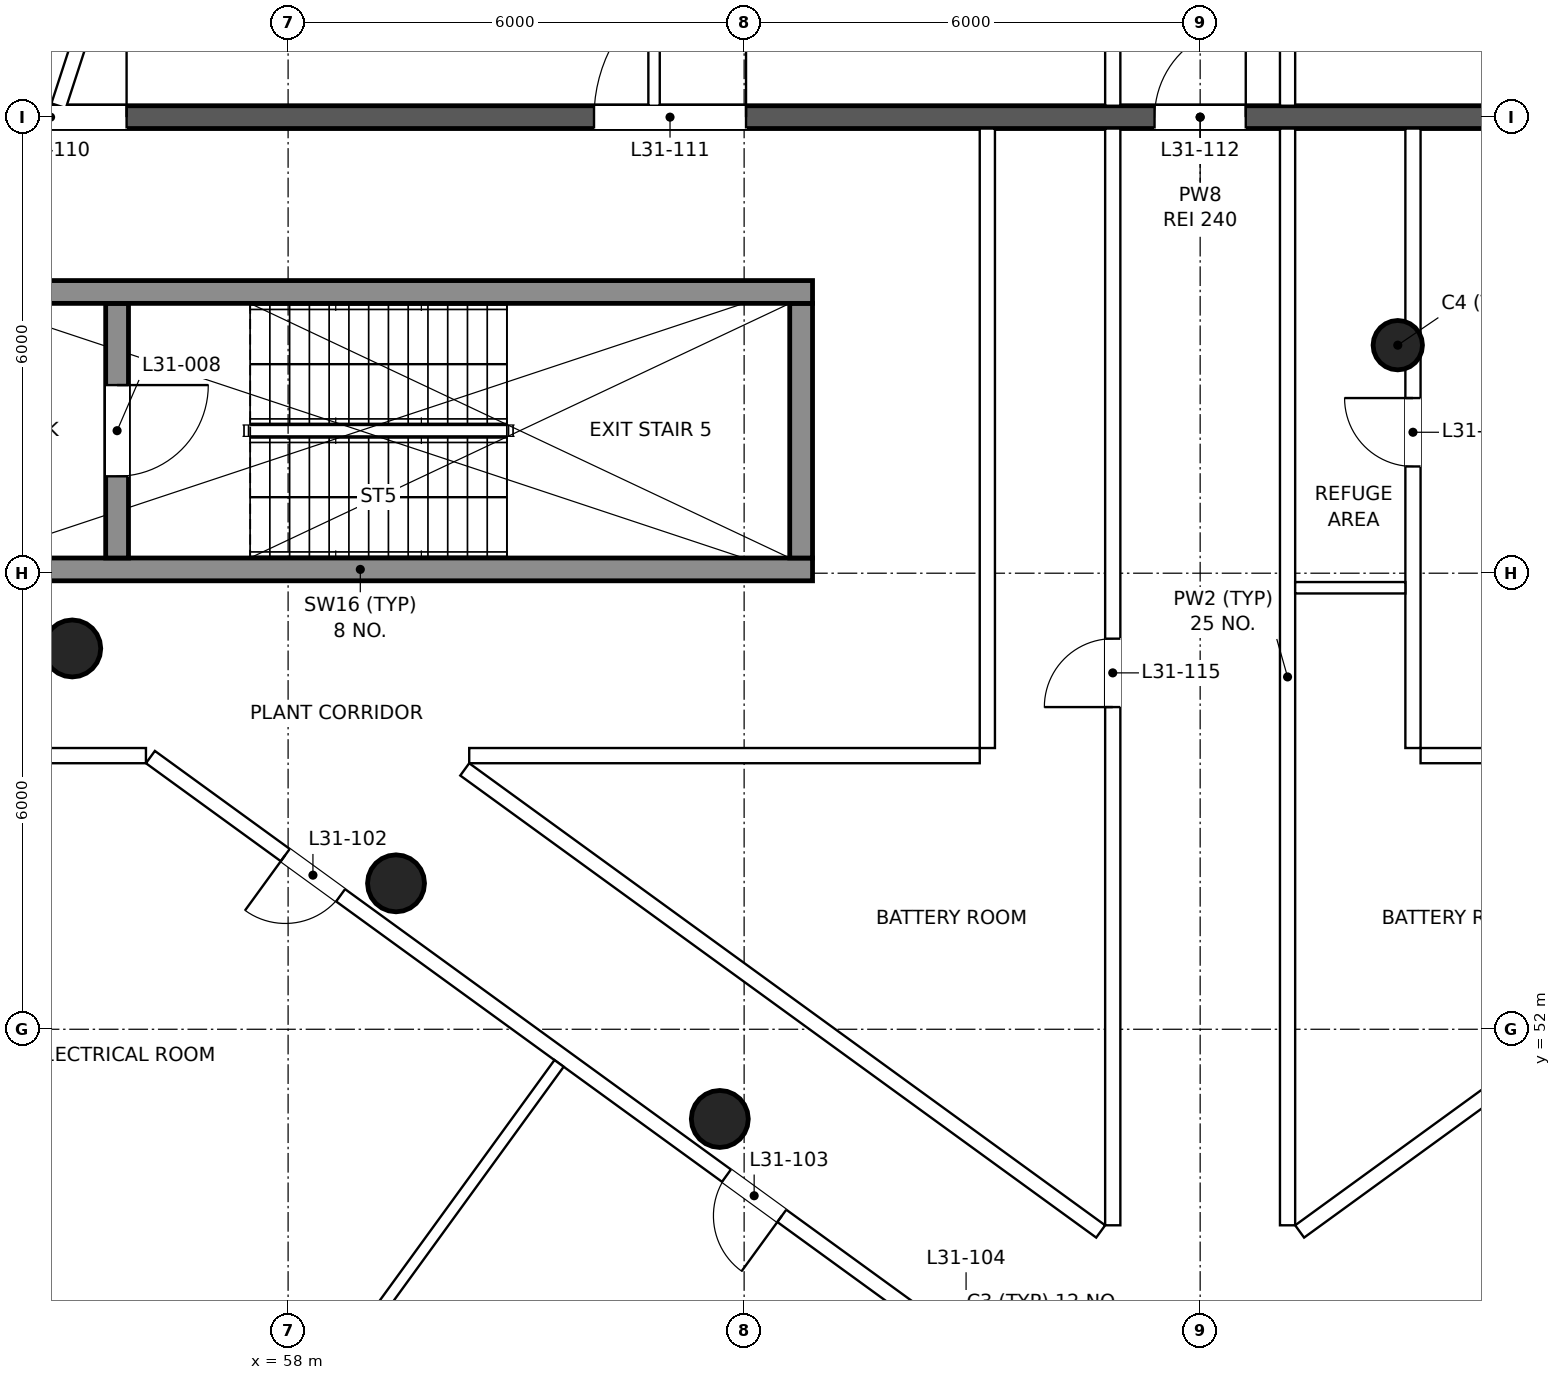
"""IFC4 building model, lengths in metres.
Left out: names, types, materials, properties, quantities, classifications, styles, units other than length and angle.
Written with IfcOpenShell. Run it as: python <this file> out.ifc"""

import sys

from ifc_helpers import new_model, si_unit, direction, frame, frame_2d, origin, origin_2d, place, context, subcontext, project, spatial, rectangle, circle, extrude, element, fill, save


model = new_model("IFC4")
c1 = context("Model", 3, precision=1e-05, world=origin(), true_north=direction((0.0, 1.0)))
c2 = subcontext(c1, "Body", "Model", "MODEL_VIEW")
j1 = project(units=[si_unit("LENGTHUNIT", "METRE"), si_unit("PLANEANGLEUNIT", "RADIAN")], contexts=[c1])
p1 = place(None, origin())
s1 = spatial("IfcSite", under=j1, at=p1, CompositionType="ELEMENT")
p2 = place(p1, origin())
s2 = spatial("IfcBuilding", under=s1, at=p2, CompositionType="ELEMENT")
p3 = place(p2, frame((0.0, 0.0, 137.6)))
s3 = spatial("IfcBuildingStorey", under=s2, at=p3, CompositionType="ELEMENT", Elevation=137.6)
for number, where, z_axis, x_axis in (
    (1, (55.16, 57.01, 0.0), (0.0, 0.0, 1.0), (1.0, 0.0, 0.0)),
    (2, (59.42, 53.92, 0.0), (0.0, 0.0, 1.0), (1.0, 0.0, 0.0)),
    (3, (63.68, 50.82, 0.0), (0.0, 0.0, 1.0), (1.0, 0.0, 0.0)),
):
    element("IfcColumn", number, at=place(p3, frame(where, z_axis=z_axis, x_axis=x_axis)), inside=s3, PredefinedType="COLUMN", context=c2, shape_type="SweptSolid", body=[
        extrude(circle(Radius=0.375, at=origin_2d()), origin(), (0.0, 0.0, 1.0), 5.0),
    ])
p4 = place(p3, frame((72.6, 61.0, 0.0), z_axis=(0.0, 0.0, 1.0), x_axis=(1.0, 0.0, 0.0)))
e4 = element("IfcColumn", 4, at=p4, inside=s3, PredefinedType="COLUMN", context=c2, shape_type="SweptSolid", body=[
    extrude(circle(Radius=0.325, at=origin_2d()), origin(), (0.0, 0.0, 1.0), 5.0),
])
p5 = place(p3, frame((52.273, 49.971, 0.0), z_axis=(0.0, 0.0, 1.0), x_axis=(0.809014428854, -0.587788783413, 0.0)))
e5 = element("IfcWall", 5, at=p5, inside=s3, PredefinedType="SOLIDWALL", context=c2, shape_type="SweptSolid", body=[
    extrude(rectangle(XDim=16.304, YDim=0.32, at=frame_2d((8.152, 0.0))), origin(), (0.0, 0.0, 1.0), 4.6),
])
p6 = place(p3, frame((53.0, 58.05, 0.0), z_axis=(0.0, 0.0, 1.0), x_axis=(1.0, 0.0, 0.0)))
e6 = element("IfcWall", 6, at=p6, inside=s3, PredefinedType="SHEAR", context=c2, shape_type="SweptSolid", body=[
    extrude(rectangle(XDim=11.9, YDim=0.3, at=frame_2d((5.95, 0.0))), origin(), (0.0, 0.0, 1.0), 5.0),
])
p7 = place(p6, frame((0.65, 0.0, 0.0)))
e7 = element("IfcOpeningElement", 7, at=p7, cuts=e6, PredefinedType="OPENING", context=c2, shape_type="SweptSolid", body=[
    extrude(rectangle(XDim=1.1, YDim=2.1, at=frame_2d((0.55, 1.05))), frame((0.0, 0.16, 0.0), z_axis=(0.0, -1.0, 0.0), x_axis=(1.0, 0.0, 0.0)), (0.0, 0.0, 1.0), 0.32),
])
p8 = place(p3, frame((55.75, 58.2, 0.0), z_axis=(0.0, 0.0, 1.0), x_axis=(0.0, 1.0, 0.0)))
e8 = element("IfcWall", 8, at=p8, inside=s3, PredefinedType="SHEAR", context=c2, shape_type="SweptSolid", body=[
    extrude(rectangle(XDim=3.35, YDim=0.3, at=frame_2d((1.675, 0.0))), origin(), (0.0, 0.0, 1.0), 5.0),
])
p9 = place(p8, frame((1.075, 0.0, 0.0)))
e9 = element("IfcOpeningElement", 9, at=p9, cuts=e8, PredefinedType="OPENING", context=c2, shape_type="SweptSolid", body=[
    extrude(rectangle(XDim=1.2, YDim=2.1, at=frame_2d((0.6, 1.05))), frame((0.0, 0.16, 0.0), z_axis=(0.0, -1.0, 0.0), x_axis=(1.0, 0.0, 0.0)), (0.0, 0.0, 1.0), 0.32),
])
p10 = place(p3, frame((64.75, 58.2, 0.0), z_axis=(0.0, 0.0, 1.0), x_axis=(0.0, 1.0, 0.0)))
e10 = element("IfcWall", 10, at=p10, inside=s3, PredefinedType="SHEAR", context=c2, shape_type="SweptSolid", body=[
    extrude(rectangle(XDim=3.35, YDim=0.3, at=frame_2d((1.675, 0.0))), origin(), (0.0, 0.0, 1.0), 5.0),
])
p11 = place(p3, frame((53.0, 61.7, 0.0), z_axis=(0.0, 0.0, 1.0), x_axis=(1.0, 0.0, 0.0)))
e11 = element("IfcWall", 11, at=p11, inside=s3, PredefinedType="SHEAR", context=c2, shape_type="SweptSolid", body=[
    extrude(rectangle(XDim=11.9, YDim=0.3, at=frame_2d((5.95, 0.0))), origin(), (0.0, 0.0, 1.0), 5.0),
])
p12 = place(p3, frame((45.49, 64.0, 0.0), z_axis=(0.0, 0.0, 1.0), x_axis=(1.0, 0.0, 0.0)))
e12 = element("IfcWall", 12, at=p12, inside=s3, PredefinedType="PARTITIONING", context=c2, shape_type="SweptSolid", body=[
    extrude(rectangle(XDim=49.02, YDim=0.3, at=frame_2d((24.51, 0.0))), origin(), (0.0, 0.0, 1.0), 3.9),
])
p13 = place(p12, frame((8.385, 0.0, 0.0)))
e13 = element("IfcOpeningElement", 13, at=p13, cuts=e12, PredefinedType="OPENING", context=c2, shape_type="SweptSolid", body=[
    extrude(rectangle(XDim=2.0, YDim=2.1, at=frame_2d((1.0, 1.05))), frame((0.0, 0.16, 0.0), z_axis=(0.0, -1.0, 0.0), x_axis=(1.0, 0.0, 0.0)), (0.0, 0.0, 1.0), 0.32),
])
p14 = place(p12, frame((16.535, 0.0, 0.0)))
e14 = element("IfcOpeningElement", 14, at=p14, cuts=e12, PredefinedType="OPENING", context=c2, shape_type="SweptSolid", body=[
    extrude(rectangle(XDim=2.0, YDim=2.1, at=frame_2d((1.0, 1.05))), frame((0.0, 0.16, 0.0), z_axis=(0.0, -1.0, 0.0), x_axis=(1.0, 0.0, 0.0)), (0.0, 0.0, 1.0), 0.32),
])
p15 = place(p12, frame((23.91, 0.0, 0.0)))
e15 = element("IfcOpeningElement", 15, at=p15, cuts=e12, PredefinedType="OPENING", context=c2, shape_type="SweptSolid", body=[
    extrude(rectangle(XDim=1.2, YDim=2.1, at=frame_2d((0.6, 1.05))), frame((0.0, 0.16, 0.0), z_axis=(0.0, -1.0, 0.0), x_axis=(1.0, 0.0, 0.0)), (0.0, 0.0, 1.0), 0.32),
])
p16 = place(p12, frame((30.435, 0.0, 0.0)))
e16 = element("IfcOpeningElement", 16, at=p16, cuts=e12, PredefinedType="OPENING", context=c2, shape_type="SweptSolid", body=[
    extrude(rectangle(XDim=2.0, YDim=2.1, at=frame_2d((1.0, 1.05))), frame((0.0, 0.16, 0.0), z_axis=(0.0, -1.0, 0.0), x_axis=(1.0, 0.0, 0.0)), (0.0, 0.0, 1.0), 0.32),
])
p17 = place(p12, frame((38.635, 0.0, 0.0)))
e17 = element("IfcOpeningElement", 17, at=p17, cuts=e12, PredefinedType="OPENING", context=c2, shape_type="SweptSolid", body=[
    extrude(rectangle(XDim=2.0, YDim=2.1, at=frame_2d((1.0, 1.05))), frame((0.0, 0.16, 0.0), z_axis=(0.0, -1.0, 0.0), x_axis=(1.0, 0.0, 0.0)), (0.0, 0.0, 1.0), 0.32),
])
p18 = place(p3, frame((52.563, 64.15, 0.0), z_axis=(0.0, 0.0, 1.0), x_axis=(0.309005574406, 0.951060226792, 0.0)))
e18 = element("IfcWall", 18, at=p18, inside=s3, PredefinedType="PARTITIONING", context=c2, shape_type="SweptSolid", body=[
    extrude(rectangle(XDim=13.373, YDim=0.2, at=frame_2d((6.687, 0.0))), origin(), (0.0, 0.0, 1.0), 4.6),
])
p19 = place(p18, frame((4.302, 0.0, 0.0)))
e19 = element("IfcOpeningElement", 19, at=p19, cuts=e18, PredefinedType="OPENING", context=c2, shape_type="SweptSolid", body=[
    extrude(rectangle(XDim=0.9, YDim=2.1, at=frame_2d((0.45, 1.05))), frame((0.0, 0.11, 0.0), z_axis=(0.0, -1.0, 0.0), x_axis=(1.0, 0.0, 0.0)), (0.0, 0.0, 1.0), 0.22),
])
p20 = place(p18, frame((10.632, 0.0, 0.0)))
e20 = element("IfcOpeningElement", 20, at=p20, cuts=e18, PredefinedType="OPENING", context=c2, shape_type="SweptSolid", body=[
    extrude(rectangle(XDim=0.9, YDim=2.1, at=frame_2d((0.45, 1.05))), frame((0.0, 0.11, 0.0), z_axis=(0.0, -1.0, 0.0), x_axis=(1.0, 0.0, 0.0)), (0.0, 0.0, 1.0), 0.22),
])
p21 = place(p3, frame((83.812, 55.581, 0.0), z_axis=(0.0, 0.0, 1.0), x_axis=(-0.809019673584, -0.58778156466, 0.0)))
e21 = element("IfcWall", 21, at=p21, inside=s3, PredefinedType="PARTITIONING", context=c2, shape_type="SweptSolid", body=[
    extrude(rectangle(XDim=14.179, YDim=0.2, at=frame_2d((7.09, 0.0))), origin(), (0.0, 0.0, 1.0), 3.6),
])
p22 = place(p21, frame((10.015, 0.0, 0.0)))
e22 = element("IfcOpeningElement", 22, at=p22, cuts=e21, PredefinedType="OPENING", context=c2, shape_type="SweptSolid", body=[
    extrude(rectangle(XDim=0.9, YDim=2.1, at=frame_2d((0.45, 1.05))), frame((0.0, 0.11, 0.0), z_axis=(0.0, -1.0, 0.0), x_axis=(1.0, 0.0, 0.0)), (0.0, 0.0, 1.0), 0.22),
])
p23 = place(p21, frame((4.094, 0.0, 0.0)))
e23 = element("IfcOpeningElement", 23, at=p23, cuts=e21, PredefinedType="OPENING", context=c2, shape_type="SweptSolid", body=[
    extrude(rectangle(XDim=0.9, YDim=2.1, at=frame_2d((0.45, 1.05))), frame((0.0, 0.11, 0.0), z_axis=(0.0, -1.0, 0.0), x_axis=(1.0, 0.0, 0.0)), (0.0, 0.0, 1.0), 0.22),
])
p24 = place(p3, frame((67.66, 47.247, 0.0), z_axis=(0.0, 0.0, 1.0), x_axis=(-0.809019673584, 0.58778156466, 0.0)))
e24 = element("IfcWall", 24, at=p24, inside=s3, PredefinedType="PARTITIONING", context=c2, shape_type="SweptSolid", body=[
    extrude(rectangle(XDim=14.179, YDim=0.2, at=frame_2d((7.09, 0.0))), origin(), (0.0, 0.0, 1.0), 3.9),
])
p25 = place(p24, frame((11.086, 0.0, 0.0)))
e25 = element("IfcOpeningElement", 25, at=p25, cuts=e24, PredefinedType="OPENING", context=c2, shape_type="SweptSolid", body=[
    extrude(rectangle(XDim=0.9, YDim=2.1, at=frame_2d((0.45, 1.05))), frame((0.0, 0.11, 0.0), z_axis=(0.0, -1.0, 0.0), x_axis=(1.0, 0.0, 0.0)), (0.0, 0.0, 1.0), 0.22),
])
p26 = place(p24, frame((3.911, 0.0, 0.0)))
e26 = element("IfcOpeningElement", 26, at=p26, cuts=e24, PredefinedType="OPENING", context=c2, shape_type="SweptSolid", body=[
    extrude(rectangle(XDim=0.9, YDim=2.1, at=frame_2d((0.45, 1.05))), frame((0.0, 0.11, 0.0), z_axis=(0.0, -1.0, 0.0), x_axis=(1.0, 0.0, 0.0)), (0.0, 0.0, 1.0), 0.22),
])
p27 = place(p24, frame((0.514, 0.0, 0.0)))
e27 = element("IfcOpeningElement", 27, at=p27, cuts=e24, PredefinedType="OPENING", context=c2, shape_type="SweptSolid", body=[
    extrude(rectangle(XDim=0.8, YDim=2.1, at=frame_2d((0.4, 1.05))), frame((0.0, 0.11, 0.0), z_axis=(0.0, -1.0, 0.0), x_axis=(1.0, 0.0, 0.0)), (0.0, 0.0, 1.0), 0.22),
])
p28 = place(p3, frame((56.13, 55.6, 0.0), z_axis=(0.0, 0.0, 1.0), x_axis=(-1.0, 0.0, 0.0)))
e28 = element("IfcWall", 28, at=p28, inside=s3, PredefinedType="PARTITIONING", context=c2, shape_type="SweptSolid", body=[
    extrude(rectangle(XDim=5.33, YDim=0.2, at=frame_2d((2.665, 0.0))), origin(), (0.0, 0.0, 1.0), 4.6),
])
p29 = place(p3, frame((71.15, 68.6, 0.0), z_axis=(0.0, 0.0, 1.0), x_axis=(0.0, -1.0, 0.0)))
e29 = element("IfcWall", 29, at=p29, inside=s3, PredefinedType="PARTITIONING", context=c2, shape_type="SweptSolid", body=[
    extrude(rectangle(XDim=4.45, YDim=0.2, at=frame_2d((2.225, 0.0))), origin(), (0.0, 0.0, 1.0), 4.6),
])
p30 = place(p3, frame((71.15, 63.85, 0.0), z_axis=(0.0, 0.0, 1.0), x_axis=(0.0, -1.0, 0.0)))
e30 = element("IfcWall", 30, at=p30, inside=s3, PredefinedType="PARTITIONING", context=c2, shape_type="SweptSolid", body=[
    extrude(rectangle(XDim=14.429, YDim=0.2, at=frame_2d((7.215, 0.0))), origin(), (0.0, 0.0, 1.0), 4.6),
])
p31 = place(p3, frame((71.309, 49.34, 0.0), z_axis=(0.0, 0.0, 1.0), x_axis=(0.809009574042, 0.587795465369, 0.0)))
e31 = element("IfcWall", 31, at=p31, inside=s3, PredefinedType="PARTITIONING", context=c2, shape_type="SweptSolid", body=[
    extrude(rectangle(XDim=10.342, YDim=0.2, at=frame_2d((5.171, 0.0))), origin(), (0.0, 0.0, 1.0), 4.05),
])
p32 = place(p31, frame((5.034, 0.0, 0.0)))
e32 = element("IfcOpeningElement", 32, at=p32, cuts=e31, PredefinedType="OPENING", context=c2, shape_type="SweptSolid", body=[
    extrude(rectangle(XDim=0.9, YDim=2.1, at=frame_2d((0.45, 1.05))), frame((0.0, 0.11, 0.0), z_axis=(0.0, -1.0, 0.0), x_axis=(1.0, 0.0, 0.0)), (0.0, 0.0, 1.0), 0.22),
])
p33 = place(p3, frame((79.617, 55.6, 0.0), z_axis=(0.0, 0.0, 1.0), x_axis=(-1.0, 0.0, 0.0)))
e33 = element("IfcWall", 33, at=p33, inside=s3, PredefinedType="PARTITIONING", context=c2, shape_type="SweptSolid", body=[
    extrude(rectangle(XDim=6.717, YDim=0.2, at=frame_2d((3.358, 0.0))), origin(), (0.0, 0.0, 1.0), 4.05),
])
p34 = place(p3, frame((72.8, 55.7, 0.0), z_axis=(0.0, 0.0, 1.0), x_axis=(0.0, 1.0, 0.0)))
e34 = element("IfcWall", 34, at=p34, inside=s3, PredefinedType="PARTITIONING", context=c2, shape_type="SweptSolid", body=[
    extrude(rectangle(XDim=8.15, YDim=0.2, at=frame_2d((4.075, 0.0))), origin(), (0.0, 0.0, 1.0), 4.6),
])
p35 = place(p34, frame((3.704, 0.0, 0.0)))
e35 = element("IfcOpeningElement", 35, at=p35, cuts=e34, PredefinedType="OPENING", context=c2, shape_type="SweptSolid", body=[
    extrude(rectangle(XDim=0.9, YDim=2.1, at=frame_2d((0.45, 1.05))), frame((0.0, 0.11, 0.0), z_axis=(0.0, -1.0, 0.0), x_axis=(1.0, 0.0, 0.0)), (0.0, 0.0, 1.0), 0.22),
])
p36 = place(p3, frame((68.85, 49.421, 0.0), z_axis=(0.0, 0.0, 1.0), x_axis=(0.0, 1.0, 0.0)))
e36 = element("IfcWall", 36, at=p36, inside=s3, PredefinedType="PARTITIONING", context=c2, shape_type="SweptSolid", body=[
    extrude(rectangle(XDim=14.429, YDim=0.2, at=frame_2d((7.215, 0.0))), origin(), (0.0, 0.0, 1.0), 4.6),
])
p37 = place(p36, frame((6.818, 0.0, 0.0)))
e37 = element("IfcOpeningElement", 37, at=p37, cuts=e36, PredefinedType="OPENING", context=c2, shape_type="SweptSolid", body=[
    extrude(rectangle(XDim=0.9, YDim=2.1, at=frame_2d((0.45, 1.05))), frame((0.0, 0.11, 0.0), z_axis=(0.0, -1.0, 0.0), x_axis=(1.0, 0.0, 0.0)), (0.0, 0.0, 1.0), 0.22),
])
p38 = place(p3, frame((68.85, 64.15, 0.0), z_axis=(0.0, 0.0, 1.0), x_axis=(0.0, 1.0, 0.0)))
e38 = element("IfcWall", 38, at=p38, inside=s3, PredefinedType="PARTITIONING", context=c2, shape_type="SweptSolid", body=[
    extrude(rectangle(XDim=4.45, YDim=0.2, at=frame_2d((2.225, 0.0))), origin(), (0.0, 0.0, 1.0), 4.6),
])
p39 = place(p3, frame((56.437, 68.631, 0.0), z_axis=(0.0, 0.0, 1.0), x_axis=(-0.309036861841, -0.951050060735, 0.0)))
e39 = element("IfcWall", 39, at=p39, inside=s3, PredefinedType="PARTITIONING", context=c2, shape_type="SweptSolid", body=[
    extrude(rectangle(XDim=4.712, YDim=0.2, at=frame_2d((2.356, 0.0))), origin(), (0.0, 0.0, 1.0), 4.6),
])
p40 = place(p3, frame((67.2, 63.85, 0.0), z_axis=(0.0, 0.0, 1.0), x_axis=(0.0, -1.0, 0.0)))
e40 = element("IfcWall", 40, at=p40, inside=s3, PredefinedType="PARTITIONING", context=c2, shape_type="SweptSolid", body=[
    extrude(rectangle(XDim=8.15, YDim=0.2, at=frame_2d((4.075, 0.0))), origin(), (0.0, 0.0, 1.0), 4.6),
])
p41 = place(p3, frame((67.1, 55.6, 0.0), z_axis=(0.0, 0.0, 1.0), x_axis=(-1.0, 0.0, 0.0)))
e41 = element("IfcWall", 41, at=p41, inside=s3, PredefinedType="PARTITIONING", context=c2, shape_type="SweptSolid", body=[
    extrude(rectangle(XDim=6.717, YDim=0.2, at=frame_2d((3.358, 0.0))), origin(), (0.0, 0.0, 1.0), 4.05),
])
p42 = place(p3, frame((60.324, 55.419, 0.0), z_axis=(0.0, 0.0, 1.0), x_axis=(0.809009574042, -0.587795465369, 0.0)))
e42 = element("IfcWall", 42, at=p42, inside=s3, PredefinedType="PARTITIONING", context=c2, shape_type="SweptSolid", body=[
    extrude(rectangle(XDim=10.342, YDim=0.2, at=frame_2d((5.171, 0.0))), origin(), (0.0, 0.0, 1.0), 3.6),
])
p43 = place(p3, frame((57.698, 46.228, 0.0), z_axis=(0.0, 0.0, 1.0), x_axis=(0.587796586364, 0.809008759569, 0.0)))
e43 = element("IfcWall", 43, at=p43, inside=s3, PredefinedType="PARTITIONING", context=c2, shape_type="SweptSolid", body=[
    extrude(rectangle(XDim=6.58, YDim=0.15, at=frame_2d((3.29, 0.0))), origin(), (0.0, 0.0, 1.0), 4.6),
])
p44 = place(p3, frame((62.815, 64.15, 0.0), z_axis=(0.0, 0.0, 1.0), x_axis=(0.0, 1.0, 0.0)))
e44 = element("IfcWall", 44, at=p44, inside=s3, PredefinedType="PARTITIONING", context=c2, shape_type="SweptSolid", body=[
    extrude(rectangle(XDim=4.45, YDim=0.15, at=frame_2d((2.225, 0.0))), origin(), (0.0, 0.0, 1.0), 4.6),
])
p45 = place(p3, frame((71.25, 57.809, 0.0), z_axis=(0.0, 0.0, 1.0), x_axis=(1.0, 0.0, 0.0)))
e45 = element("IfcWall", 45, at=p45, inside=s3, PredefinedType="PARTITIONING", context=c2, shape_type="SweptSolid", body=[
    extrude(rectangle(XDim=1.45, YDim=0.15, at=frame_2d((0.725, 0.0))), origin(), (0.0, 0.0, 1.0), 4.6),
])
p46 = place(p9, frame((1.2, 0.0, 0.0), z_axis=(0.0, 0.0, 1.0), x_axis=(-1.0, 0.0, 0.0)))
e46 = element("IfcDoor", 46, at=p46, inside=s3, OperationType="SINGLE_SWING_LEFT", PredefinedType="DOOR", context=c2, shape_type="SweptSolid", body=[
    extrude(rectangle(XDim=1.2, YDim=2.1, at=frame_2d((0.6, 1.05))), frame((0.0, 0.025, 0.0), z_axis=(0.0, -1.0, 0.0), x_axis=(1.0, 0.0, 0.0)), (0.0, 0.0, 1.0), 0.05),
])
fill(e9, e46)
p47 = place(p25, origin())
e47 = element("IfcDoor", 47, at=p47, inside=s3, OperationType="SINGLE_SWING_RIGHT", PredefinedType="DOOR", context=c2, shape_type="SweptSolid", body=[
    extrude(rectangle(XDim=0.9, YDim=2.1, at=frame_2d((0.45, 1.05))), frame((0.0, 0.025, 0.0), z_axis=(0.0, -1.0, 0.0), x_axis=(1.0, 0.0, 0.0)), (0.0, 0.0, 1.0), 0.05),
])
fill(e25, e47)
p48 = place(p26, origin())
e48 = element("IfcDoor", 48, at=p48, inside=s3, OperationType="SINGLE_SWING_LEFT", PredefinedType="DOOR", context=c2, shape_type="SweptSolid", body=[
    extrude(rectangle(XDim=0.9, YDim=2.1, at=frame_2d((0.45, 1.05))), frame((0.0, 0.025, 0.0), z_axis=(0.0, -1.0, 0.0), x_axis=(1.0, 0.0, 0.0)), (0.0, 0.0, 1.0), 0.05),
])
fill(e26, e48)
p49 = place(p13, origin())
e49 = element("IfcDoor", 49, at=p49, inside=s3, OperationType="DOUBLE_DOOR_SINGLE_SWING", PredefinedType="DOOR", context=c2, shape_type="SweptSolid", body=[
    extrude(rectangle(XDim=2.0, YDim=2.1, at=frame_2d((1.0, 1.05))), frame((0.0, 0.025, 0.0), z_axis=(0.0, -1.0, 0.0), x_axis=(1.0, 0.0, 0.0)), (0.0, 0.0, 1.0), 0.05),
])
fill(e13, e49)
p50 = place(p14, origin())
e50 = element("IfcDoor", 50, at=p50, inside=s3, OperationType="DOUBLE_DOOR_SINGLE_SWING", PredefinedType="DOOR", context=c2, shape_type="SweptSolid", body=[
    extrude(rectangle(XDim=2.0, YDim=2.1, at=frame_2d((1.0, 1.05))), frame((0.0, 0.025, 0.0), z_axis=(0.0, -1.0, 0.0), x_axis=(1.0, 0.0, 0.0)), (0.0, 0.0, 1.0), 0.05),
])
fill(e14, e50)
p51 = place(p15, origin())
e51 = element("IfcDoor", 51, at=p51, inside=s3, OperationType="SINGLE_SWING_RIGHT", PredefinedType="DOOR", context=c2, shape_type="SweptSolid", body=[
    extrude(rectangle(XDim=1.2, YDim=2.1, at=frame_2d((0.6, 1.05))), frame((0.0, 0.025, 0.0), z_axis=(0.0, -1.0, 0.0), x_axis=(1.0, 0.0, 0.0)), (0.0, 0.0, 1.0), 0.05),
])
fill(e15, e51)
p52 = place(p37, origin())
e52 = element("IfcDoor", 52, at=p52, inside=s3, OperationType="SINGLE_SWING_LEFT", PredefinedType="DOOR", context=c2, shape_type="SweptSolid", body=[
    extrude(rectangle(XDim=0.9, YDim=2.1, at=frame_2d((0.45, 1.05))), frame((0.0, 0.025, 0.0), z_axis=(0.0, -1.0, 0.0), x_axis=(1.0, 0.0, 0.0)), (0.0, 0.0, 1.0), 0.05),
])
fill(e37, e52)
p53 = place(p35, origin())
e53 = element("IfcDoor", 53, at=p53, inside=s3, OperationType="SINGLE_SWING_RIGHT", PredefinedType="DOOR", context=c2, shape_type="SweptSolid", body=[
    extrude(rectangle(XDim=0.9, YDim=2.1, at=frame_2d((0.45, 1.05))), frame((0.0, 0.025, 0.0), z_axis=(0.0, -1.0, 0.0), x_axis=(1.0, 0.0, 0.0)), (0.0, 0.0, 1.0), 0.05),
])
fill(e35, e53)
save(model, sys.argv[1])
